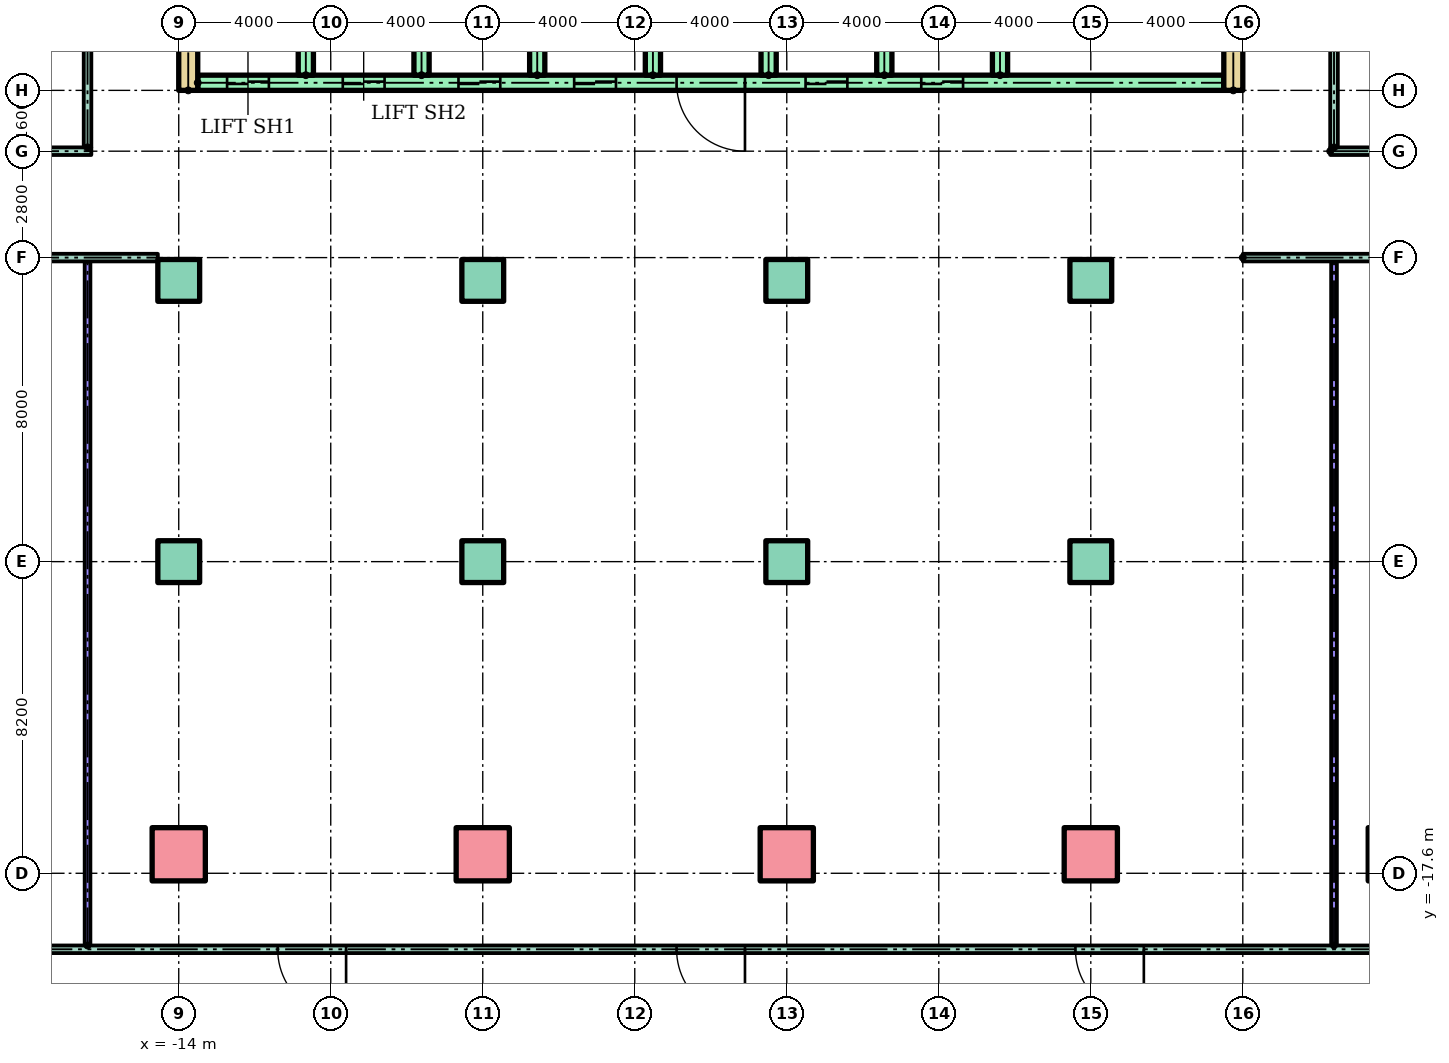
"""IFC4 building model, lengths in metres.
Left out: names, types, materials, properties, quantities, classifications, styles, units other than length and angle.
Written with IfcOpenShell. Run it as: python <this file> out.ifc"""

import sys

from ifc_helpers import new_model, si_unit, direction, frame, frame_2d, origin, origin_2d, place, context, subcontext, project, spatial, rectangle, hollow_rectangle, extrude, element, fill, save


model = new_model("IFC4")
c1 = context("Model", 3, precision=1e-05, world=origin(), true_north=direction((0.0, 1.0)))
c2 = subcontext(c1, "Body", "Model", "MODEL_VIEW")
j1 = project(units=[si_unit("LENGTHUNIT", "METRE"), si_unit("PLANEANGLEUNIT", "RADIAN")], contexts=[c1])
p1 = place(None, origin())
s1 = spatial("IfcSite", under=j1, at=p1, CompositionType="ELEMENT")
p2 = place(p1, origin())
s2 = spatial("IfcBuilding", under=s1, at=p2, CompositionType="ELEMENT")
p3 = place(p2, origin())
s3 = spatial("IfcBuildingStorey", under=s2, at=p3, CompositionType="ELEMENT", Elevation=0.0)
for number, where in (
    (1, (-14.0, -17.1, 0.0)),
    (2, (-6.0, -17.1, 0.0)),
    (3, (2.0, -17.1, 0.0)),
    (4, (10.0, -17.1, 0.0)),
    (5, (18.0, -17.1, 0.0)),
):
    element("IfcColumn", number, at=place(p3, frame(where)), inside=s3, PredefinedType="COLUMN", context=c2, shape_type="SweptSolid", body=[
        extrude(hollow_rectangle(XDim=1.4, YDim=1.4, WallThickness=0.08, at=origin_2d()), origin(), (0.0, 0.0, 1.0), 6.0),
    ])
for number, where in (
    (6, (-14.0, -9.4, 0.0)),
    (7, (-6.0, -9.4, 0.0)),
    (8, (2.0, -9.4, 0.0)),
    (9, (10.0, -9.4, 0.0)),
    (10, (-14.0, -2.0, 0.0)),
    (11, (-6.0, -2.0, 0.0)),
    (12, (2.0, -2.0, 0.0)),
    (13, (10.0, -2.0, 0.0)),
):
    element("IfcColumn", number, at=place(p3, frame(where)), inside=s3, PredefinedType="COLUMN", context=c2, shape_type="SweptSolid", body=[
        extrude(rectangle(XDim=1.1, YDim=1.1, at=origin_2d()), origin(), (0.0, 0.0, 1.0), 6.0),
    ])
for number, where, z_axis, x_axis in (
    (14, (-13.75, 3.0, 0.0), (0.0, 0.0, 1.0), (0.0, 1.0, 0.0)),
    (15, (13.75, 3.0, 0.0), (0.0, 0.0, 1.0), (0.0, 1.0, 0.0)),
):
    element("IfcWall", number, at=place(p3, frame(where, z_axis=z_axis, x_axis=x_axis)), inside=s3, PredefinedType="SHEAR", context=c2, shape_type="SweptSolid", body=[
        extrude(rectangle(XDim=17.0, YDim=0.5, at=frame_2d((8.5, 0.0))), origin(), (0.0, 0.0, 1.0), 5.7),
    ])
p4 = place(p3, frame((-13.5, 3.2, 0.0)))
e16 = element("IfcWall", 16, at=p4, inside=s3, PredefinedType="SHEAR", context=c2, shape_type="SweptSolid", body=[
    extrude(rectangle(XDim=27.0, YDim=0.4, at=frame_2d((13.5, 0.0))), origin(), (0.0, 0.0, 1.0), 5.7),
])
p5 = place(p4, frame((0.772, 0.0, 0.0)))
e17 = element("IfcOpeningElement", 17, at=p5, cuts=e16, PredefinedType="OPENING", context=c2, shape_type="SweptSolid", body=[
    extrude(rectangle(XDim=1.1, YDim=2.1, at=frame_2d((0.55, 1.05))), frame((0.0, 0.21, 0.0), z_axis=(0.0, -1.0, 0.0), x_axis=(1.0, 0.0, 0.0)), (0.0, 0.0, 1.0), 0.42),
])
p6 = place(p4, frame((3.817, 0.0, 0.0)))
e18 = element("IfcOpeningElement", 18, at=p6, cuts=e16, PredefinedType="OPENING", context=c2, shape_type="SweptSolid", body=[
    extrude(rectangle(XDim=1.1, YDim=2.1, at=frame_2d((0.55, 1.05))), frame((0.0, 0.21, 0.0), z_axis=(0.0, -1.0, 0.0), x_axis=(1.0, 0.0, 0.0)), (0.0, 0.0, 1.0), 0.42),
])
p7 = place(p4, frame((6.861, 0.0, 0.0)))
e19 = element("IfcOpeningElement", 19, at=p7, cuts=e16, PredefinedType="OPENING", context=c2, shape_type="SweptSolid", body=[
    extrude(rectangle(XDim=1.1, YDim=2.1, at=frame_2d((0.55, 1.05))), frame((0.0, 0.21, 0.0), z_axis=(0.0, -1.0, 0.0), x_axis=(1.0, 0.0, 0.0)), (0.0, 0.0, 1.0), 0.42),
])
p8 = place(p4, frame((9.906, 0.0, 0.0)))
e20 = element("IfcOpeningElement", 20, at=p8, cuts=e16, PredefinedType="OPENING", context=c2, shape_type="SweptSolid", body=[
    extrude(rectangle(XDim=1.1, YDim=2.1, at=frame_2d((0.55, 1.05))), frame((0.0, 0.21, 0.0), z_axis=(0.0, -1.0, 0.0), x_axis=(1.0, 0.0, 0.0)), (0.0, 0.0, 1.0), 0.42),
])
p9 = place(p4, frame((15.994, 0.0, 0.0)))
e21 = element("IfcOpeningElement", 21, at=p9, cuts=e16, PredefinedType="OPENING", context=c2, shape_type="SweptSolid", body=[
    extrude(rectangle(XDim=1.1, YDim=2.1, at=frame_2d((0.55, 1.05))), frame((0.0, 0.21, 0.0), z_axis=(0.0, -1.0, 0.0), x_axis=(1.0, 0.0, 0.0)), (0.0, 0.0, 1.0), 0.42),
])
p10 = place(p4, frame((19.039, 0.0, 0.0)))
e22 = element("IfcOpeningElement", 22, at=p10, cuts=e16, PredefinedType="OPENING", context=c2, shape_type="SweptSolid", body=[
    extrude(rectangle(XDim=1.1, YDim=2.1, at=frame_2d((0.55, 1.05))), frame((0.0, 0.21, 0.0), z_axis=(0.0, -1.0, 0.0), x_axis=(1.0, 0.0, 0.0)), (0.0, 0.0, 1.0), 0.42),
])
p11 = place(p4, frame((12.6, 0.0, 0.0)))
e23 = element("IfcOpeningElement", 23, at=p11, cuts=e16, PredefinedType="OPENING", context=c2, shape_type="SweptSolid", body=[
    extrude(rectangle(XDim=1.8, YDim=2.1, at=frame_2d((0.9, 1.05))), frame((0.0, 0.21, 0.0), z_axis=(0.0, -1.0, 0.0), x_axis=(1.0, 0.0, 0.0)), (0.0, 0.0, 1.0), 0.42),
])
for number, where, z_axis, x_axis in (
    (24, (-10.656, 3.4, 0.0), (0.0, 0.0, 1.0), (0.0, 1.0, 0.0)),
    (25, (-7.611, 3.4, 0.0), (0.0, 0.0, 1.0), (0.0, 1.0, 0.0)),
    (26, (-4.567, 3.4, 0.0), (0.0, 0.0, 1.0), (0.0, 1.0, 0.0)),
    (27, (-1.522, 3.4, 0.0), (0.0, 0.0, 1.0), (0.0, 1.0, 0.0)),
    (28, (1.522, 3.4, 0.0), (0.0, 0.0, 1.0), (0.0, 1.0, 0.0)),
    (29, (4.567, 3.4, 0.0), (0.0, 0.0, 1.0), (0.0, 1.0, 0.0)),
    (30, (7.611, 3.4, 0.0), (0.0, 0.0, 1.0), (0.0, 1.0, 0.0)),
):
    element("IfcWall", number, at=place(p3, frame(where, z_axis=z_axis, x_axis=x_axis)), inside=s3, PredefinedType="SHEAR", context=c2, shape_type="SweptSolid", body=[
        extrude(rectangle(XDim=3.0, YDim=0.4, at=frame_2d((1.5, 0.0))), origin(), (0.0, 0.0, 1.0), 5.7),
    ])
p12 = place(p3, frame((-37.6, -19.6, 0.0)))
e31 = element("IfcWall", 31, at=p12, inside=s3, PredefinedType="PARTITIONING", context=c2, shape_type="SweptSolid", body=[
    extrude(rectangle(XDim=75.2, YDim=0.2, at=frame_2d((37.6, 0.0))), origin(), (0.0, 0.0, 1.0), 5.7),
])
p13 = place(p12, frame((26.204, 0.0, 0.0)))
e32 = element("IfcOpeningElement", 32, at=p13, cuts=e31, PredefinedType="OPENING", context=c2, shape_type="SweptSolid", body=[
    extrude(rectangle(XDim=1.8, YDim=2.1, at=frame_2d((0.9, 1.05))), frame((0.0, 0.11, 0.0), z_axis=(0.0, -1.0, 0.0), x_axis=(1.0, 0.0, 0.0)), (0.0, 0.0, 1.0), 0.22),
])
p14 = place(p12, frame((36.7, 0.0, 0.0)))
e33 = element("IfcOpeningElement", 33, at=p14, cuts=e31, PredefinedType="OPENING", context=c2, shape_type="SweptSolid", body=[
    extrude(rectangle(XDim=1.8, YDim=2.1, at=frame_2d((0.9, 1.05))), frame((0.0, 0.11, 0.0), z_axis=(0.0, -1.0, 0.0), x_axis=(1.0, 0.0, 0.0)), (0.0, 0.0, 1.0), 0.22),
])
p15 = place(p12, frame((47.196, 0.0, 0.0)))
e34 = element("IfcOpeningElement", 34, at=p15, cuts=e31, PredefinedType="OPENING", context=c2, shape_type="SweptSolid", body=[
    extrude(rectangle(XDim=1.8, YDim=2.1, at=frame_2d((0.9, 1.05))), frame((0.0, 0.11, 0.0), z_axis=(0.0, -1.0, 0.0), x_axis=(1.0, 0.0, 0.0)), (0.0, 0.0, 1.0), 0.22),
])
p16 = place(p3, frame((-21.45, -1.4, 0.0)))
e35 = element("IfcWall", 35, at=p16, inside=s3, PredefinedType="PARTITIONING", context=c2, shape_type="SweptSolid", body=[
    extrude(rectangle(XDim=6.9, YDim=0.2, at=frame_2d((3.45, 0.0))), origin(), (0.0, 0.0, 1.0), 5.7),
])
p17 = place(p3, frame((14.0, -1.4, 0.0)))
e36 = element("IfcWall", 36, at=p17, inside=s3, PredefinedType="PARTITIONING", context=c2, shape_type="SweptSolid", body=[
    extrude(rectangle(XDim=3.45, YDim=0.2, at=frame_2d((1.725, 0.0))), origin(), (0.0, 0.0, 1.0), 5.7),
])
p18 = place(p3, frame((-21.45, 1.4, 0.0)))
e37 = element("IfcWall", 37, at=p18, inside=s3, PredefinedType="PARTITIONING", context=c2, shape_type="SweptSolid", body=[
    extrude(rectangle(XDim=5.15, YDim=0.2, at=frame_2d((2.575, 0.0))), origin(), (0.0, 0.0, 1.0), 5.7),
])
p19 = place(p18, frame((0.35, 0.0, 0.0)))
e38 = element("IfcOpeningElement", 38, at=p19, cuts=e37, PredefinedType="OPENING", context=c2, shape_type="SweptSolid", body=[
    extrude(rectangle(XDim=1.0, YDim=2.1, at=frame_2d((0.5, 1.05))), frame((0.0, 0.11, 0.0), z_axis=(0.0, -1.0, 0.0), x_axis=(1.0, 0.0, 0.0)), (0.0, 0.0, 1.0), 0.22),
])
p20 = place(p18, frame((2.95, 0.0, 0.0)))
e39 = element("IfcOpeningElement", 39, at=p20, cuts=e37, PredefinedType="OPENING", context=c2, shape_type="SweptSolid", body=[
    extrude(rectangle(XDim=1.0, YDim=2.1, at=frame_2d((0.5, 1.05))), frame((0.0, 0.11, 0.0), z_axis=(0.0, -1.0, 0.0), x_axis=(1.0, 0.0, 0.0)), (0.0, 0.0, 1.0), 0.22),
])
p21 = place(p3, frame((16.3, 1.4, 0.0)))
e40 = element("IfcWall", 40, at=p21, inside=s3, PredefinedType="PARTITIONING", context=c2, shape_type="SweptSolid", body=[
    extrude(rectangle(XDim=1.15, YDim=0.2, at=frame_2d((0.575, 0.0))), origin(), (0.0, 0.0, 1.0), 5.7),
])
p22 = place(p3, frame((-16.4, 1.5, 0.0), z_axis=(0.0, 0.0, 1.0), x_axis=(0.0, 1.0, 0.0)))
e41 = element("IfcWall", 41, at=p22, inside=s3, PredefinedType="PARTITIONING", context=c2, shape_type="SweptSolid", body=[
    extrude(rectangle(XDim=7.0, YDim=0.2, at=frame_2d((3.5, 0.0))), origin(), (0.0, 0.0, 1.0), 5.7),
])
p23 = place(p3, frame((-16.4, -19.5, 0.0), z_axis=(0.0, 0.0, 1.0), x_axis=(0.0, 1.0, 0.0)))
e42 = element("IfcWall", 42, at=p23, inside=s3, PredefinedType="PARTITIONING", context=c2, shape_type="SweptSolid", body=[
    extrude(rectangle(XDim=18.0, YDim=0.15, at=frame_2d((9.0, 0.0))), origin(), (0.0, 0.0, 1.0), 5.7),
])
p24 = place(p3, frame((16.4, 1.5, 0.0), z_axis=(0.0, 0.0, 1.0), x_axis=(0.0, 1.0, 0.0)))
e43 = element("IfcWall", 43, at=p24, inside=s3, PredefinedType="PARTITIONING", context=c2, shape_type="SweptSolid", body=[
    extrude(rectangle(XDim=6.4, YDim=0.2, at=frame_2d((3.2, 0.0))), origin(), (0.0, 0.0, 1.0), 5.7),
])
p25 = place(p3, frame((16.4, -19.5, 0.0), z_axis=(0.0, 0.0, 1.0), x_axis=(0.0, 1.0, 0.0)))
e44 = element("IfcWall", 44, at=p25, inside=s3, PredefinedType="PARTITIONING", context=c2, shape_type="SweptSolid", body=[
    extrude(rectangle(XDim=18.0, YDim=0.15, at=frame_2d((9.0, 0.0))), origin(), (0.0, 0.0, 1.0), 5.7),
])
p26 = place(p5, origin())
e45 = element("IfcDoor", 45, at=p26, inside=s3, OperationType="SLIDING_TO_LEFT", PredefinedType="DOOR", context=c2, shape_type="SweptSolid", body=[
    extrude(rectangle(XDim=1.1, YDim=2.1, at=frame_2d((0.55, 1.05))), frame((0.0, 0.025, 0.0), z_axis=(0.0, -1.0, 0.0), x_axis=(1.0, 0.0, 0.0)), (0.0, 0.0, 1.0), 0.05),
])
fill(e17, e45)
p27 = place(p6, origin())
e46 = element("IfcDoor", 46, at=p27, inside=s3, OperationType="SLIDING_TO_LEFT", PredefinedType="DOOR", context=c2, shape_type="SweptSolid", body=[
    extrude(rectangle(XDim=1.1, YDim=2.1, at=frame_2d((0.55, 1.05))), frame((0.0, 0.025, 0.0), z_axis=(0.0, -1.0, 0.0), x_axis=(1.0, 0.0, 0.0)), (0.0, 0.0, 1.0), 0.05),
])
fill(e18, e46)
p28 = place(p7, origin())
e47 = element("IfcDoor", 47, at=p28, inside=s3, OperationType="SLIDING_TO_LEFT", PredefinedType="DOOR", context=c2, shape_type="SweptSolid", body=[
    extrude(rectangle(XDim=1.1, YDim=2.1, at=frame_2d((0.55, 1.05))), frame((0.0, 0.025, 0.0), z_axis=(0.0, -1.0, 0.0), x_axis=(1.0, 0.0, 0.0)), (0.0, 0.0, 1.0), 0.05),
])
fill(e19, e47)
p29 = place(p8, origin())
e48 = element("IfcDoor", 48, at=p29, inside=s3, OperationType="SLIDING_TO_LEFT", PredefinedType="DOOR", context=c2, shape_type="SweptSolid", body=[
    extrude(rectangle(XDim=1.1, YDim=2.1, at=frame_2d((0.55, 1.05))), frame((0.0, 0.025, 0.0), z_axis=(0.0, -1.0, 0.0), x_axis=(1.0, 0.0, 0.0)), (0.0, 0.0, 1.0), 0.05),
])
fill(e20, e48)
p30 = place(p9, origin())
e49 = element("IfcDoor", 49, at=p30, inside=s3, OperationType="SLIDING_TO_LEFT", PredefinedType="DOOR", context=c2, shape_type="SweptSolid", body=[
    extrude(rectangle(XDim=1.1, YDim=2.1, at=frame_2d((0.55, 1.05))), frame((0.0, 0.025, 0.0), z_axis=(0.0, -1.0, 0.0), x_axis=(1.0, 0.0, 0.0)), (0.0, 0.0, 1.0), 0.05),
])
fill(e21, e49)
p31 = place(p10, origin())
e50 = element("IfcDoor", 50, at=p31, inside=s3, OperationType="SLIDING_TO_LEFT", PredefinedType="DOOR", context=c2, shape_type="SweptSolid", body=[
    extrude(rectangle(XDim=1.1, YDim=2.1, at=frame_2d((0.55, 1.05))), frame((0.0, 0.025, 0.0), z_axis=(0.0, -1.0, 0.0), x_axis=(1.0, 0.0, 0.0)), (0.0, 0.0, 1.0), 0.05),
])
fill(e22, e50)
p32 = place(p11, frame((1.8, 0.0, 0.0), z_axis=(0.0, 0.0, 1.0), x_axis=(-1.0, 0.0, 0.0)))
e51 = element("IfcDoor", 51, at=p32, inside=s3, OperationType="DOUBLE_DOOR_SINGLE_SWING", PredefinedType="DOOR", context=c2, shape_type="SweptSolid", body=[
    extrude(rectangle(XDim=1.8, YDim=2.1, at=frame_2d((0.9, 1.05))), frame((0.0, 0.025, 0.0), z_axis=(0.0, -1.0, 0.0), x_axis=(1.0, 0.0, 0.0)), (0.0, 0.0, 1.0), 0.05),
])
fill(e23, e51)
p33 = place(p13, frame((1.8, 0.0, 0.0), z_axis=(0.0, 0.0, 1.0), x_axis=(-1.0, 0.0, 0.0)))
e52 = element("IfcDoor", 52, at=p33, inside=s3, OperationType="DOUBLE_DOOR_SINGLE_SWING", PredefinedType="DOOR", context=c2, shape_type="SweptSolid", body=[
    extrude(rectangle(XDim=1.8, YDim=2.1, at=frame_2d((0.9, 1.05))), frame((0.0, 0.025, 0.0), z_axis=(0.0, -1.0, 0.0), x_axis=(1.0, 0.0, 0.0)), (0.0, 0.0, 1.0), 0.05),
])
fill(e32, e52)
p34 = place(p14, frame((1.8, 0.0, 0.0), z_axis=(0.0, 0.0, 1.0), x_axis=(-1.0, 0.0, 0.0)))
e53 = element("IfcDoor", 53, at=p34, inside=s3, OperationType="DOUBLE_DOOR_SINGLE_SWING", PredefinedType="DOOR", context=c2, shape_type="SweptSolid", body=[
    extrude(rectangle(XDim=1.8, YDim=2.1, at=frame_2d((0.9, 1.05))), frame((0.0, 0.025, 0.0), z_axis=(0.0, -1.0, 0.0), x_axis=(1.0, 0.0, 0.0)), (0.0, 0.0, 1.0), 0.05),
])
fill(e33, e53)
p35 = place(p15, frame((1.8, 0.0, 0.0), z_axis=(0.0, 0.0, 1.0), x_axis=(-1.0, 0.0, 0.0)))
e54 = element("IfcDoor", 54, at=p35, inside=s3, OperationType="DOUBLE_DOOR_SINGLE_SWING", PredefinedType="DOOR", context=c2, shape_type="SweptSolid", body=[
    extrude(rectangle(XDim=1.8, YDim=2.1, at=frame_2d((0.9, 1.05))), frame((0.0, 0.025, 0.0), z_axis=(0.0, -1.0, 0.0), x_axis=(1.0, 0.0, 0.0)), (0.0, 0.0, 1.0), 0.05),
])
fill(e34, e54)
save(model, sys.argv[1])
